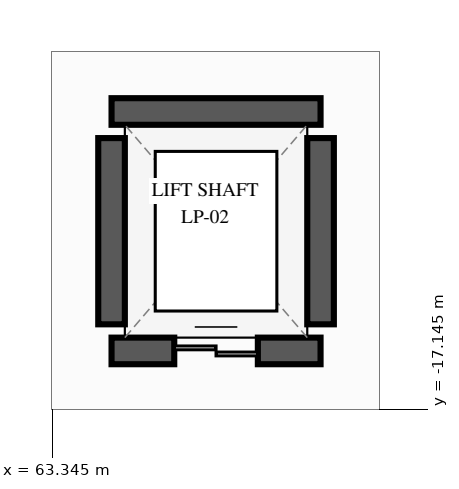
"""IFC4 building model, lengths in metres.
Left out: names, types, materials, properties, quantities, classifications, styles, units other than length and angle.
Written with IfcOpenShell. Run it as: python <this file> out.ifc"""

import sys

from ifc_helpers import new_model, si_unit, direction, frame, frame_2d, origin, place, context, subcontext, project, spatial, rectangle, extrude, element, fill, save


model = new_model("IFC4")
c1 = context("Model", 3, precision=1e-05, world=origin(), true_north=direction((0.0, 1.0)))
c2 = subcontext(c1, "Body", "Model", "MODEL_VIEW")
j1 = project(units=[si_unit("LENGTHUNIT", "METRE"), si_unit("PLANEANGLEUNIT", "RADIAN")], contexts=[c1])
p1 = place(None, origin())
s1 = spatial("IfcSite", under=j1, at=p1, CompositionType="ELEMENT")
p2 = place(p1, origin())
s2 = spatial("IfcBuilding", under=s1, at=p2, CompositionType="ELEMENT")
p3 = place(p2, origin())
s3 = spatial("IfcBuildingStorey", under=s2, at=p3, CompositionType="ELEMENT", Elevation=0.0)
p4 = place(p3, frame((64.125, -16.375, 0.0), z_axis=(0.0, 0.0, 1.0), x_axis=(1.0, 0.0, 0.0)))
e1 = element("IfcWall", 1, at=p4, inside=s3, PredefinedType="SHEAR", context=c2, shape_type="SweptSolid", body=[
    extrude(rectangle(XDim=2.75, YDim=0.35, at=frame_2d((1.375, 0.0))), origin(), (0.0, 0.0, 1.0), 5.12),
])
p5 = place(p4, frame((0.825, 0.0, 0.0)))
e2 = element("IfcOpeningElement", 2, at=p5, cuts=e1, PredefinedType="OPENING", context=c2, shape_type="SweptSolid", body=[
    extrude(rectangle(XDim=1.1, YDim=2.2, at=frame_2d((0.55, 1.1))), frame((0.0, 0.185, 0.0), z_axis=(0.0, -1.0, 0.0), x_axis=(1.0, 0.0, 0.0)), (0.0, 0.0, 1.0), 0.37),
])
p6 = place(p3, frame((66.875, -13.225, 0.0), z_axis=(0.0, 0.0, 1.0), x_axis=(-1.0, 0.0, 0.0)))
e3 = element("IfcWall", 3, at=p6, inside=s3, PredefinedType="SHEAR", context=c2, shape_type="SweptSolid", body=[
    extrude(rectangle(XDim=2.75, YDim=0.35, at=frame_2d((1.375, 0.0))), origin(), (0.0, 0.0, 1.0), 5.12),
])
for number, where, z_axis, x_axis in (
    (4, (64.125, -16.025, 0.0), (0.0, 0.0, 1.0), (0.0, 1.0, 0.0)),
    (5, (66.875, -16.025, 0.0), (0.0, 0.0, 1.0), (0.0, 1.0, 0.0)),
):
    element("IfcWall", number, at=place(p3, frame(where, z_axis=z_axis, x_axis=x_axis)), inside=s3, PredefinedType="SHEAR", context=c2, shape_type="SweptSolid", body=[
        extrude(rectangle(XDim=2.45, YDim=0.35, at=frame_2d((1.225, 0.0))), origin(), (0.0, 0.0, 1.0), 5.12),
    ])
p7 = place(p5, origin())
e6 = element("IfcDoor", 6, at=p7, inside=s3, OperationType="DOUBLE_DOOR_SLIDING", PredefinedType="DOOR", context=c2, shape_type="SweptSolid", body=[
    extrude(rectangle(XDim=1.1, YDim=2.2, at=frame_2d((0.55, 1.1))), frame((0.0, 0.025, 0.0), z_axis=(0.0, -1.0, 0.0), x_axis=(1.0, 0.0, 0.0)), (0.0, 0.0, 1.0), 0.05),
])
fill(e2, e6)
save(model, sys.argv[1])
